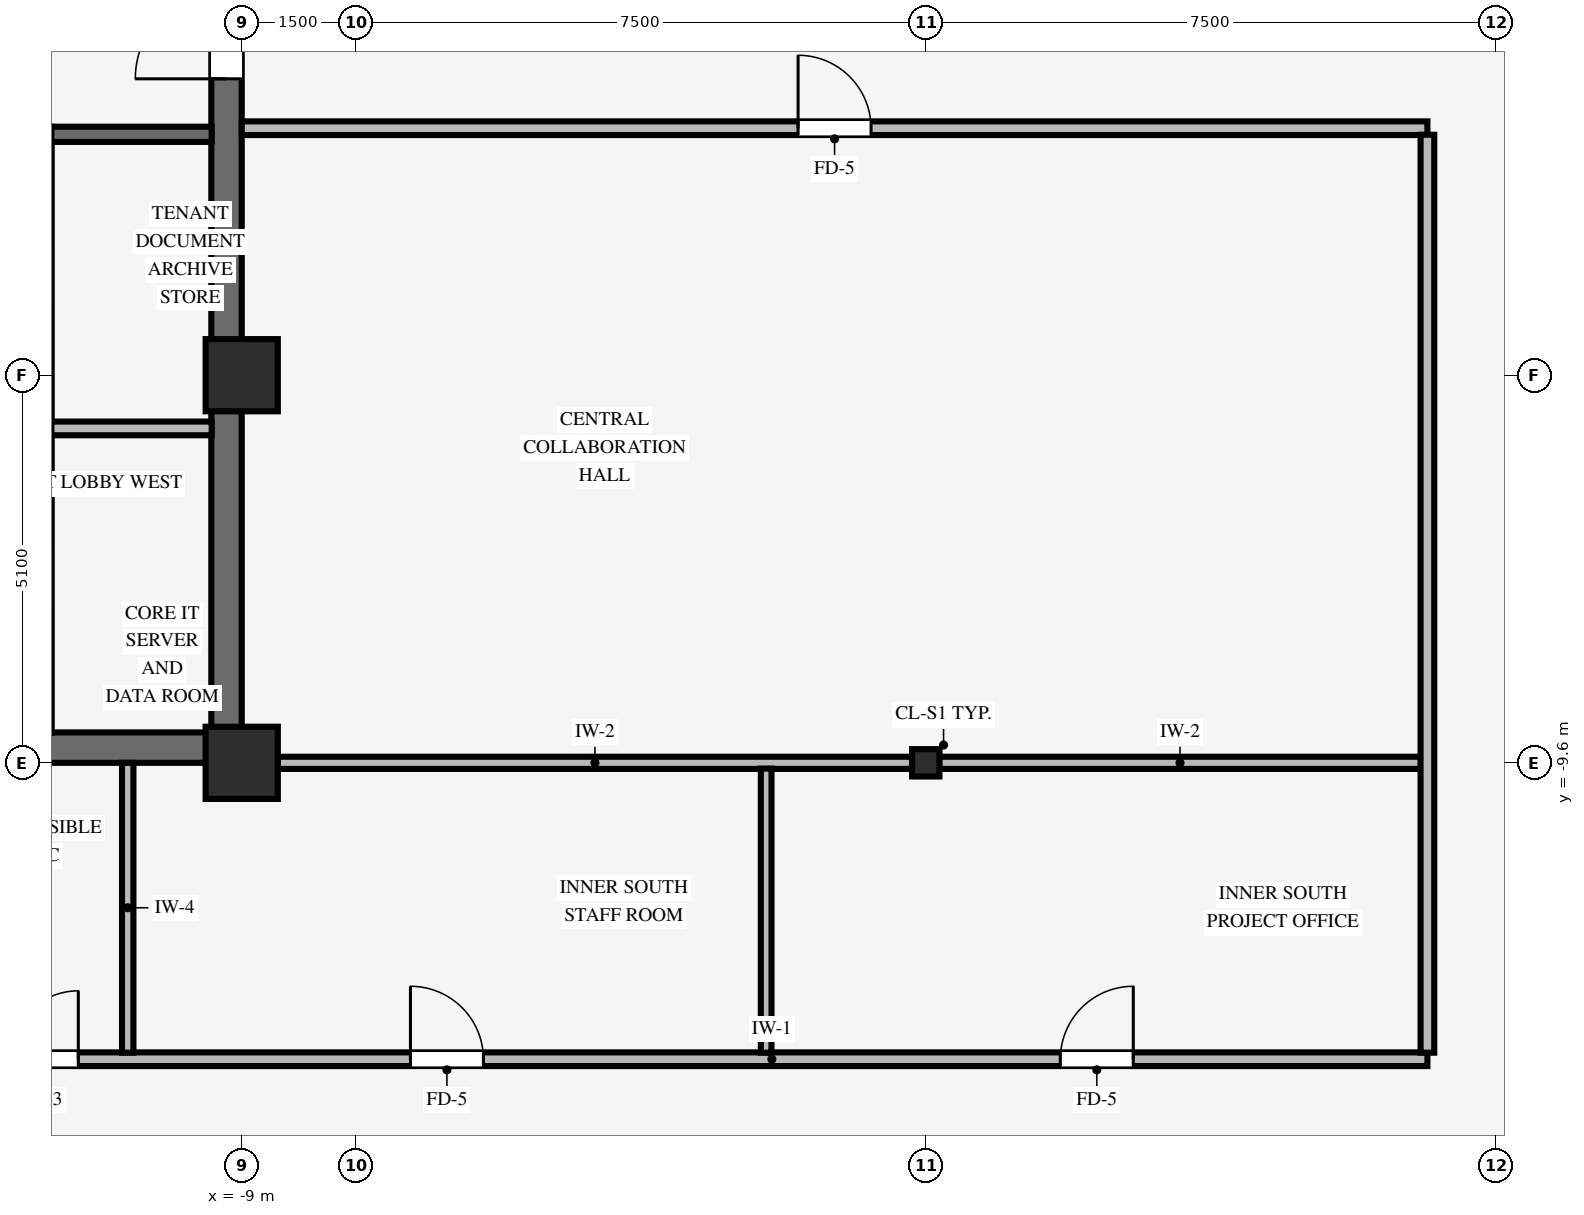
"""IFC4 building model, lengths in metres.
Left out: names, types, materials, properties, quantities, classifications, styles, units other than length and angle.
Written with IfcOpenShell. Run it as: python <this file> out.ifc"""

import sys

from ifc_helpers import new_model, si_unit, direction, frame, frame_2d, origin, origin_2d, place, context, subcontext, project, spatial, rectangle, i_section, extrude, source, transform, mapped, element, fill, save


model = new_model("IFC4")
c1 = context("Model", 3, precision=1e-05, world=origin(), true_north=direction((0.0, 1.0)))
c2 = subcontext(c1, "Body", "Model", "MODEL_VIEW")
j1 = project(units=[si_unit("LENGTHUNIT", "METRE"), si_unit("PLANEANGLEUNIT", "RADIAN")], contexts=[c1])
p1 = place(None, origin())
s1 = spatial("IfcSite", under=j1, at=p1, CompositionType="ELEMENT")
p2 = place(p1, origin())
s2 = spatial("IfcBuilding", under=s1, at=p2, CompositionType="ELEMENT")
p3 = place(p2, frame((0.0, 0.0, 134.8)))
s3 = spatial("IfcBuildingStorey", under=s2, at=p3, CompositionType="ELEMENT", Elevation=134.8)
p4 = place(p3, frame((-17.5, -9.4, 0.0), z_axis=(0.0, 0.0, 1.0), x_axis=(1.0, 0.0, 0.0)))
e1 = element("IfcWall", 1, at=p4, inside=s3, PredefinedType="SHEAR", context=c2, shape_type="SweptSolid", body=[
    extrude(rectangle(XDim=8.5, YDim=0.4, at=frame_2d((4.25, 0.0))), origin(), (0.0, 0.0, 1.0), 3.37),
])
p5 = place(p3, frame((-9.2, -9.205, 0.0), z_axis=(0.0, 0.0, 1.0), x_axis=(0.0, 1.0, 0.0)))
e2 = element("IfcWall", 2, at=p5, inside=s3, PredefinedType="SHEAR", context=c2, shape_type="SweptSolid", body=[
    extrude(rectangle(XDim=18.41, YDim=0.4, at=frame_2d((9.205, 0.0))), origin(), (0.0, 0.0, 1.0), 3.37),
])
p6 = place(p5, frame((8.605, 0.0, 0.0)))
e3 = element("IfcOpeningElement", 3, at=p6, cuts=e2, PredefinedType="OPENING", context=c2, shape_type="SweptSolid", body=[
    extrude(rectangle(XDim=1.2, YDim=2.15, at=frame_2d((0.6, 1.075))), frame((0.0, 0.21, 0.0), z_axis=(0.0, -1.0, 0.0), x_axis=(1.0, 0.0, 0.0)), (0.0, 0.0, 1.0), 0.42),
])
for number, where, z_axis, x_axis in (
    (4, (-9.0, -9.6, 0.0), (0.0, 0.0, 1.0), (1.0, 0.0, 0.0)),
    (5, (-9.0, -4.5, 0.0), (0.0, 0.0, 1.0), (1.0, 0.0, 0.0)),
):
    element("IfcColumn", number, at=place(p3, frame(where, z_axis=z_axis, x_axis=x_axis)), inside=s3, PredefinedType="COLUMN", context=c2, shape_type="SweptSolid", body=[
        extrude(rectangle(XDim=0.95, YDim=0.95, at=origin_2d()), origin(), (0.0, 0.0, 1.0), 3.37),
    ])
p7 = place(p3, frame((0.0, -9.6, 0.0), z_axis=(0.0, 0.0, 1.0), x_axis=(1.0, 0.0, 0.0)))
e6 = element("IfcColumn", 6, at=p7, inside=s3, PredefinedType="COLUMN", context=c2, shape_type="SweptSolid", body=[
    extrude(i_section(OverallWidth=0.36, OverallDepth=0.36, WebThickness=0.021, FlangeThickness=0.021, FilletRadius=0.018, at=origin_2d()), origin(), (0.0, 0.0, 1.0), 3.37),
])
p8 = place(p3, frame((-11.505, -1.33, 0.0), z_axis=(0.0, 0.0, 1.0), x_axis=(1.0, 0.0, 0.0)))
e7 = element("IfcWall", 7, at=p8, inside=s3, PredefinedType="SHEAR", context=c2, shape_type="SweptSolid", body=[
    extrude(rectangle(XDim=2.11, YDim=0.2, at=frame_2d((1.055, 0.0))), origin(), (0.0, 0.0, 1.0), 3.37),
])
p9 = place(p3, frame((-11.505, -5.2, 0.0), z_axis=(0.0, 0.0, 1.0), x_axis=(1.0, 0.0, 0.0)))
e8 = element("IfcWall", 8, at=p9, inside=s3, PredefinedType="PARTITIONING", context=c2, shape_type="SweptSolid", body=[
    extrude(rectangle(XDim=2.11, YDim=0.18, at=frame_2d((1.055, 0.0))), origin(), (0.0, 0.0, 1.0), 3.36),
])
p10 = place(p3, frame((-17.7, -13.5, 0.0), z_axis=(0.0, 0.0, 1.0), x_axis=(1.0, 0.0, 0.0)))
e9 = element("IfcWall", 9, at=p10, inside=s3, PredefinedType="PARTITIONING", context=c2, shape_type="SweptSolid", body=[
    extrude(rectangle(XDim=24.3, YDim=0.18, at=frame_2d((12.15, 0.0))), origin(), (0.0, 0.0, 1.0), 2.998),
])
p11 = place(p10, frame((19.47, 0.0, 0.0)))
e10 = element("IfcOpeningElement", 10, at=p11, cuts=e9, PredefinedType="OPENING", context=c2, shape_type="SweptSolid", body=[
    extrude(rectangle(XDim=0.96, YDim=2.1, at=frame_2d((0.48, 1.05))), frame((0.0, 0.1, 0.0), z_axis=(0.0, -1.0, 0.0), x_axis=(1.0, 0.0, 0.0)), (0.0, 0.0, 1.0), 0.2),
])
p12 = place(p10, frame((10.92, 0.0, 0.0)))
e11 = element("IfcOpeningElement", 11, at=p12, cuts=e9, PredefinedType="OPENING", context=c2, shape_type="SweptSolid", body=[
    extrude(rectangle(XDim=0.96, YDim=2.1, at=frame_2d((0.48, 1.05))), frame((0.0, 0.1, 0.0), z_axis=(0.0, -1.0, 0.0), x_axis=(1.0, 0.0, 0.0)), (0.0, 0.0, 1.0), 0.2),
])
p13 = place(p10, frame((3.3, 0.0, 0.0)))
e12 = element("IfcOpeningElement", 12, at=p13, cuts=e9, PredefinedType="OPENING", context=c2, shape_type="SweptSolid", body=[
    extrude(rectangle(XDim=0.9, YDim=2.1, at=frame_2d((0.45, 1.05))), frame((0.0, 0.1, 0.0), z_axis=(0.0, -1.0, 0.0), x_axis=(1.0, 0.0, 0.0)), (0.0, 0.0, 1.0), 0.2),
])
p14 = place(p10, frame((5.65, 0.0, 0.0)))
e13 = element("IfcOpeningElement", 13, at=p14, cuts=e9, PredefinedType="OPENING", context=c2, shape_type="SweptSolid", body=[
    extrude(rectangle(XDim=0.9, YDim=2.1, at=frame_2d((0.45, 1.05))), frame((0.0, 0.1, 0.0), z_axis=(0.0, -1.0, 0.0), x_axis=(1.0, 0.0, 0.0)), (0.0, 0.0, 1.0), 0.2),
])
p15 = place(p3, frame((-8.529, -9.6, 0.0), z_axis=(0.0, 0.0, 1.0), x_axis=(1.0, 0.0, 0.0)))
e14 = element("IfcWall", 14, at=p15, inside=s3, PredefinedType="PARTITIONING", context=c2, shape_type="SweptSolid", body=[
    extrude(rectangle(XDim=8.353, YDim=0.16, at=frame_2d((4.177, 0.0))), origin(), (0.0, 0.0, 1.0), 2.405),
])
p16 = place(p3, frame((0.176, -9.6, 0.0), z_axis=(0.0, 0.0, 1.0), x_axis=(1.0, 0.0, 0.0)))
e15 = element("IfcWall", 15, at=p16, inside=s3, PredefinedType="PARTITIONING", context=c2, shape_type="SweptSolid", body=[
    extrude(rectangle(XDim=6.338, YDim=0.16, at=frame_2d((3.169, 0.0))), origin(), (0.0, 0.0, 1.0), 2.405),
])
p17 = place(p3, frame((-9.0, -1.25, 0.0), z_axis=(0.0, 0.0, 1.0), x_axis=(1.0, 0.0, 0.0)))
e16 = element("IfcWall", 16, at=p17, inside=s3, PredefinedType="PARTITIONING", context=c2, shape_type="SweptSolid", body=[
    extrude(rectangle(XDim=15.6, YDim=0.18, at=frame_2d((7.8, 0.0))), origin(), (0.0, 0.0, 1.0), 3.36),
])
p18 = place(p17, frame((7.32, 0.0, 0.0)))
e17 = element("IfcOpeningElement", 17, at=p18, cuts=e16, PredefinedType="OPENING", context=c2, shape_type="SweptSolid", body=[
    extrude(rectangle(XDim=0.96, YDim=2.1, at=frame_2d((0.48, 1.05))), frame((0.0, 0.1, 0.0), z_axis=(0.0, -1.0, 0.0), x_axis=(1.0, 0.0, 0.0)), (0.0, 0.0, 1.0), 0.2),
])
p19 = place(p3, frame((-10.5, -13.414, 0.0), z_axis=(0.0, 0.0, 1.0), x_axis=(0.0, 1.0, 0.0)))
e18 = element("IfcWall", 18, at=p19, inside=s3, PredefinedType="PARTITIONING", context=c2, shape_type="SweptSolid", body=[
    extrude(rectangle(XDim=3.814, YDim=0.15, at=frame_2d((1.907, 0.0))), origin(), (0.0, 0.0, 1.0), 3.36),
])
p20 = place(p3, frame((-2.1, -13.414, 0.0), z_axis=(0.0, 0.0, 1.0), x_axis=(0.0, 1.0, 0.0)))
e19 = element("IfcWall", 19, at=p20, inside=s3, PredefinedType="PARTITIONING", context=c2, shape_type="SweptSolid", body=[
    extrude(rectangle(XDim=3.738, YDim=0.14, at=frame_2d((1.869, 0.0))), origin(), (0.0, 0.0, 1.0), 3.36),
])
p21 = place(p3, frame((6.6, -13.414, 0.0), z_axis=(0.0, 0.0, 1.0), x_axis=(0.0, 1.0, 0.0)))
e20 = element("IfcWall", 20, at=p21, inside=s3, PredefinedType="PARTITIONING", context=c2, shape_type="SweptSolid", body=[
    extrude(rectangle(XDim=12.078, YDim=0.18, at=frame_2d((6.039, 0.0))), origin(), (0.0, 0.0, 1.0), 3.36),
])
m1 = source(origin(), c2, "Body", "SweptSolid", [
    extrude(rectangle(XDim=1.2, YDim=2.15, at=frame_2d((0.6, 1.075))), frame((0.0, 0.025, 0.0), z_axis=(0.0, -1.0, 0.0), x_axis=(1.0, 0.0, 0.0)), (0.0, 0.0, 1.0), 0.05),
])
p22 = place(p6, origin())
e21 = element("IfcDoor", 21, at=p22, inside=s3, OperationType="SINGLE_SWING_LEFT", PredefinedType="DOOR", context=c2, shape_type="MappedRepresentation", body=[
    mapped(m1, transform((0.0, 0.0, 0.0), scale=1.0)),
])
fill(e3, e21)
m2 = source(origin(), c2, "Body", "SweptSolid", [
    extrude(rectangle(XDim=0.96, YDim=2.1, at=frame_2d((0.48, 1.05))), frame((0.0, 0.025, 0.0), z_axis=(0.0, -1.0, 0.0), x_axis=(1.0, 0.0, 0.0)), (0.0, 0.0, 1.0), 0.05),
])
p23 = place(p18, origin())
e22 = element("IfcDoor", 22, at=p23, inside=s3, OperationType="SINGLE_SWING_LEFT", PredefinedType="DOOR", context=c2, shape_type="MappedRepresentation", body=[
    mapped(m2, transform((0.0, 0.0, 0.0), scale=1.0)),
])
fill(e17, e22)
p24 = place(p11, origin())
e23 = element("IfcDoor", 23, at=p24, inside=s3, OperationType="SINGLE_SWING_RIGHT", PredefinedType="DOOR", context=c2, shape_type="MappedRepresentation", body=[
    mapped(m2, transform((0.0, 0.0, 0.0), scale=1.0)),
])
fill(e10, e23)
p25 = place(p12, origin())
e24 = element("IfcDoor", 24, at=p25, inside=s3, OperationType="SINGLE_SWING_LEFT", PredefinedType="DOOR", context=c2, shape_type="MappedRepresentation", body=[
    mapped(m2, transform((0.0, 0.0, 0.0), scale=1.0)),
])
fill(e11, e24)
m3 = source(origin(), c2, "Body", "SweptSolid", [
    extrude(rectangle(XDim=0.9, YDim=2.1, at=frame_2d((0.45, 1.05))), frame((0.0, 0.025, 0.0), z_axis=(0.0, -1.0, 0.0), x_axis=(1.0, 0.0, 0.0)), (0.0, 0.0, 1.0), 0.05),
])
p26 = place(p14, origin())
e25 = element("IfcDoor", 25, at=p26, inside=s3, OperationType="SINGLE_SWING_RIGHT", PredefinedType="DOOR", context=c2, shape_type="MappedRepresentation", body=[
    mapped(m3, transform((0.0, 0.0, 0.0), scale=1.0)),
])
fill(e13, e25)
save(model, sys.argv[1])
